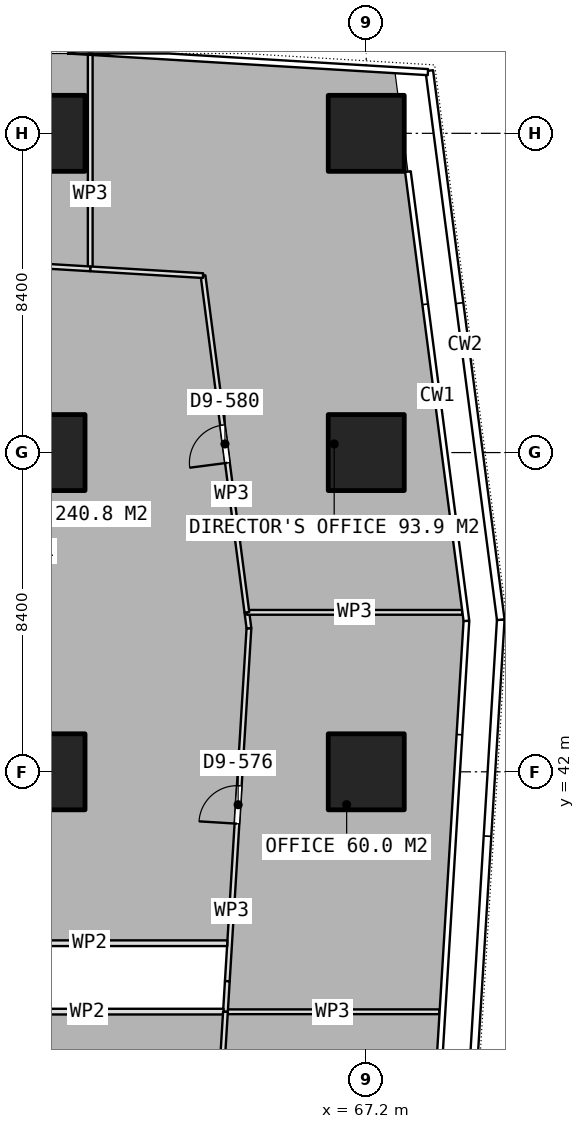
"""IFC4 building model, lengths in metres.
Left out: names, types, materials, properties, quantities, classifications, styles, units other than length and angle.
Written with IfcOpenShell. Run it as: python <this file> out.ifc"""

import sys

from ifc_helpers import new_model, si_unit, direction, frame, frame_2d, origin, origin_2d, place, context, subcontext, project, spatial, rectangle, extrude, element, fill, save


model = new_model("IFC4")
c1 = context("Model", 3, precision=1e-05, world=origin(), true_north=direction((0.0, 1.0)))
c2 = subcontext(c1, "Body", "Model", "MODEL_VIEW")
j1 = project(units=[si_unit("LENGTHUNIT", "METRE"), si_unit("PLANEANGLEUNIT", "RADIAN")], contexts=[c1])
p1 = place(None, origin())
s1 = spatial("IfcSite", under=j1, at=p1, CompositionType="ELEMENT")
p2 = place(p1, origin())
s2 = spatial("IfcBuilding", under=s1, at=p2, CompositionType="ELEMENT")
p3 = place(p2, frame((0.0, 0.0, 144.05)))
s3 = spatial("IfcBuildingStorey", under=s2, at=p3, CompositionType="ELEMENT", Elevation=144.05)
for number, where, z_axis, x_axis in (
    (1, (58.8, 42.0, 0.0), (0.0, 0.0, 1.0), (1.0, 0.0, 0.0)),
    (2, (58.8, 50.4, 0.0), (0.0, 0.0, 1.0), (1.0, 0.0, 0.0)),
    (3, (58.8, 58.8, 0.0), (0.0, 0.0, 1.0), (1.0, 0.0, 0.0)),
    (4, (67.2, 42.0, 0.0), (0.0, 0.0, 1.0), (1.0, 0.0, 0.0)),
    (5, (67.2, 50.4, 0.0), (0.0, 0.0, 1.0), (1.0, 0.0, 0.0)),
    (6, (67.2, 58.8, 0.0), (0.0, 0.0, 1.0), (1.0, 0.0, 0.0)),
):
    element("IfcColumn", number, at=place(p3, frame(where, z_axis=z_axis, x_axis=x_axis)), inside=s3, PredefinedType="COLUMN", context=c2, shape_type="SweptSolid", body=[
        extrude(rectangle(XDim=2.0, YDim=2.0, at=origin_2d()), origin(), (0.0, 0.0, 1.0), 3.75),
    ])
p4 = place(p3, frame((63.024, 27.998, 0.0), z_axis=(0.0, 0.0, 1.0), x_axis=(0.061174508596, 0.998127085845, 0.0)))
e7 = element("IfcWall", 7, at=p4, inside=s3, PredefinedType="PARTITIONING", context=c2, shape_type="SweptSolid", body=[
    extrude(rectangle(XDim=7.702, YDim=0.125, at=frame_2d((3.851, 0.0))), origin(), (0.0, 0.0, 1.0), 3.5),
])
p5 = place(p4, frame((3.351, 0.0, 0.0)))
e8 = element("IfcOpeningElement", 8, at=p5, cuts=e7, PredefinedType="OPENING", context=c2, shape_type="SweptSolid", body=[
    extrude(rectangle(XDim=1.0, YDim=2.1, at=frame_2d((0.5, 1.05))), frame((0.0, 0.073, 0.0), z_axis=(0.0, -1.0, 0.0), x_axis=(1.0, 0.0, 0.0)), (0.0, 0.0, 1.0), 0.145),
])
p6 = place(p3, frame((63.495, 35.686, 0.0), z_axis=(0.0, 0.0, 1.0), x_axis=(1.0, 0.0, 0.0)))
e9 = element("IfcWall", 9, at=p6, inside=s3, PredefinedType="PARTITIONING", context=c2, shape_type="SweptSolid", body=[
    extrude(rectangle(XDim=5.631, YDim=0.125, at=frame_2d((2.815, 0.0))), origin(), (0.0, 0.0, 1.0), 3.5),
])
p7 = place(p3, frame((63.544, 36.491, 0.0), z_axis=(0.0, 0.0, 1.0), x_axis=(0.061169286548, 0.998127405887, 0.0)))
e10 = element("IfcWall", 10, at=p7, inside=s3, PredefinedType="PARTITIONING", context=c2, shape_type="SweptSolid", body=[
    extrude(rectangle(XDim=9.303, YDim=0.125, at=frame_2d((4.652, 0.0))), origin(), (0.0, 0.0, 1.0), 3.5),
])
p8 = place(p7, frame((4.152, 0.0, 0.0)))
e11 = element("IfcOpeningElement", 11, at=p8, cuts=e10, PredefinedType="OPENING", context=c2, shape_type="SweptSolid", body=[
    extrude(rectangle(XDim=1.0, YDim=2.1, at=frame_2d((0.5, 1.05))), frame((0.0, 0.073, 0.0), z_axis=(0.0, -1.0, 0.0), x_axis=(1.0, 0.0, 0.0)), (0.0, 0.0, 1.0), 0.145),
])
p9 = place(p3, frame((64.113, 45.777, 0.0), z_axis=(0.0, 0.0, 1.0), x_axis=(-0.127732925799, 0.991808600319, 0.0)))
e12 = element("IfcWall", 12, at=p9, inside=s3, PredefinedType="PARTITIONING", context=c2, shape_type="SweptSolid", body=[
    extrude(rectangle(XDim=0.422, YDim=0.125, at=frame_2d((0.211, 0.0))), origin(), (0.0, 0.0, 1.0), 3.5),
])
p10 = place(p3, frame((64.059, 46.196, 0.0), z_axis=(0.0, 0.0, 1.0), x_axis=(1.0, 0.0, 0.0)))
e13 = element("IfcWall", 13, at=p10, inside=s3, PredefinedType="PARTITIONING", context=c2, shape_type="SweptSolid", body=[
    extrude(rectangle(XDim=5.667, YDim=0.125, at=frame_2d((2.833, 0.0))), origin(), (0.0, 0.0, 1.0), 3.5),
])
p11 = place(p3, frame((63.495, 35.687, 0.0), z_axis=(0.0, 0.0, 1.0), x_axis=(0.060623183924, 0.998160723316, 0.0)))
e14 = element("IfcWall", 14, at=p11, inside=s3, PredefinedType="PARTITIONING", context=c2, shape_type="SweptSolid", body=[
    extrude(rectangle(XDim=0.805, YDim=0.125, at=frame_2d((0.403, 0.0))), origin(), (0.0, 0.0, 1.0), 3.5),
])
p12 = place(p3, frame((59.937, 55.234, 0.0), z_axis=(0.0, 0.0, 1.0), x_axis=(0.0, 1.0, 0.0)))
e15 = element("IfcWall", 15, at=p12, inside=s3, PredefinedType="PARTITIONING", context=c2, shape_type="SweptSolid", body=[
    extrude(rectangle(XDim=5.66, YDim=0.125, at=frame_2d((2.83, 0.0))), origin(), (0.0, 0.0, 1.0), 3.5),
])
p13 = place(p3, frame((64.059, 46.197, 0.0), z_axis=(0.0, 0.0, 1.0), x_axis=(-0.129179126048, 0.991621275182, 0.0)))
e16 = element("IfcWall", 16, at=p13, inside=s3, PredefinedType="PARTITIONING", context=c2, shape_type="SweptSolid", body=[
    extrude(rectangle(XDim=8.934, YDim=0.125, at=frame_2d((4.467, 0.0))), origin(), (0.0, 0.0, 1.0), 3.5),
])
p14 = place(p13, frame((3.967, 0.0, 0.0)))
e17 = element("IfcOpeningElement", 17, at=p14, cuts=e16, PredefinedType="OPENING", context=c2, shape_type="SweptSolid", body=[
    extrude(rectangle(XDim=1.0, YDim=2.1, at=frame_2d((0.5, 1.05))), frame((0.0, 0.073, 0.0), z_axis=(0.0, -1.0, 0.0), x_axis=(1.0, 0.0, 0.0)), (0.0, 0.0, 1.0), 0.145),
])
p15 = place(p3, frame((62.905, 55.056, 0.0), z_axis=(0.0, 0.0, 1.0), x_axis=(-0.998206906615, 0.059857928348, 0.0)))
e18 = element("IfcWall", 18, at=p15, inside=s3, PredefinedType="PARTITIONING", context=c2, shape_type="SweptSolid", body=[
    extrude(rectangle(XDim=2.973, YDim=0.125, at=frame_2d((1.487, 0.0))), origin(), (0.0, 0.0, 1.0), 3.5),
])
p16 = place(p3, frame((59.936, 55.234, 0.0), z_axis=(0.0, 0.0, 1.0), x_axis=(-0.998198743515, 0.059993903398, 0.0)))
e19 = element("IfcWall", 19, at=p16, inside=s3, PredefinedType="PARTITIONING", context=c2, shape_type="SweptSolid", body=[
    extrude(rectangle(XDim=6.751, YDim=0.125, at=frame_2d((3.375, 0.0))), origin(), (0.0, 0.0, 1.0), 3.5),
])
p17 = place(p16, frame((2.876, 0.0, 0.0)))
e20 = element("IfcOpeningElement", 20, at=p17, cuts=e19, PredefinedType="OPENING", context=c2, shape_type="SweptSolid", body=[
    extrude(rectangle(XDim=1.0, YDim=2.1, at=frame_2d((0.5, 1.05))), frame((0.0, 0.073, 0.0), z_axis=(0.0, -1.0, 0.0), x_axis=(1.0, 0.0, 0.0)), (0.0, 0.0, 1.0), 0.145),
])
p18 = place(p3, frame((63.543, 37.49, 0.0), z_axis=(0.0, 0.0, 1.0), x_axis=(-1.0, 0.0, 0.0)))
e21 = element("IfcWall", 21, at=p18, inside=s3, PredefinedType="PARTITIONING", context=c2, shape_type="SweptSolid", body=[
    extrude(rectangle(XDim=10.343, YDim=0.15, at=frame_2d((5.171, 0.0))), origin(), (0.0, 0.0, 1.0), 3.5),
])
p19 = place(p3, frame((53.2, 35.69, 0.0), z_axis=(0.0, 0.0, 1.0), x_axis=(1.0, 0.0, 0.0)))
e22 = element("IfcWall", 22, at=p19, inside=s3, PredefinedType="PARTITIONING", context=c2, shape_type="SweptSolid", body=[
    extrude(rectangle(XDim=10.246, YDim=0.15, at=frame_2d((5.123, 0.0))), origin(), (0.0, 0.0, 1.0), 3.5),
])
p20 = place(p19, frame((3.547, 0.0, 0.0)))
e23 = element("IfcOpeningElement", 23, at=p20, cuts=e22, PredefinedType="OPENING", context=c2, shape_type="SweptSolid", body=[
    extrude(rectangle(XDim=1.0, YDim=2.1, at=frame_2d((0.5, 1.05))), frame((0.0, 0.085, 0.0), z_axis=(0.0, -1.0, 0.0), x_axis=(1.0, 0.0, 0.0)), (0.0, 0.0, 1.0), 0.17),
])
p21 = place(p8, origin())
e24 = element("IfcDoor", 24, at=p21, inside=s3, OperationType="SINGLE_SWING_LEFT", PredefinedType="DOOR", context=c2, shape_type="SweptSolid", body=[
    extrude(rectangle(XDim=1.0, YDim=2.1, at=frame_2d((0.5, 1.05))), frame((0.0, 0.025, 0.0), z_axis=(0.0, -1.0, 0.0), x_axis=(1.0, 0.0, 0.0)), (0.0, 0.0, 1.0), 0.05),
])
fill(e11, e24)
p22 = place(p14, origin())
e25 = element("IfcDoor", 25, at=p22, inside=s3, OperationType="SINGLE_SWING_LEFT", PredefinedType="DOOR", context=c2, shape_type="SweptSolid", body=[
    extrude(rectangle(XDim=1.0, YDim=2.1, at=frame_2d((0.5, 1.05))), frame((0.0, 0.025, 0.0), z_axis=(0.0, -1.0, 0.0), x_axis=(1.0, 0.0, 0.0)), (0.0, 0.0, 1.0), 0.05),
])
fill(e17, e25)
save(model, sys.argv[1])
